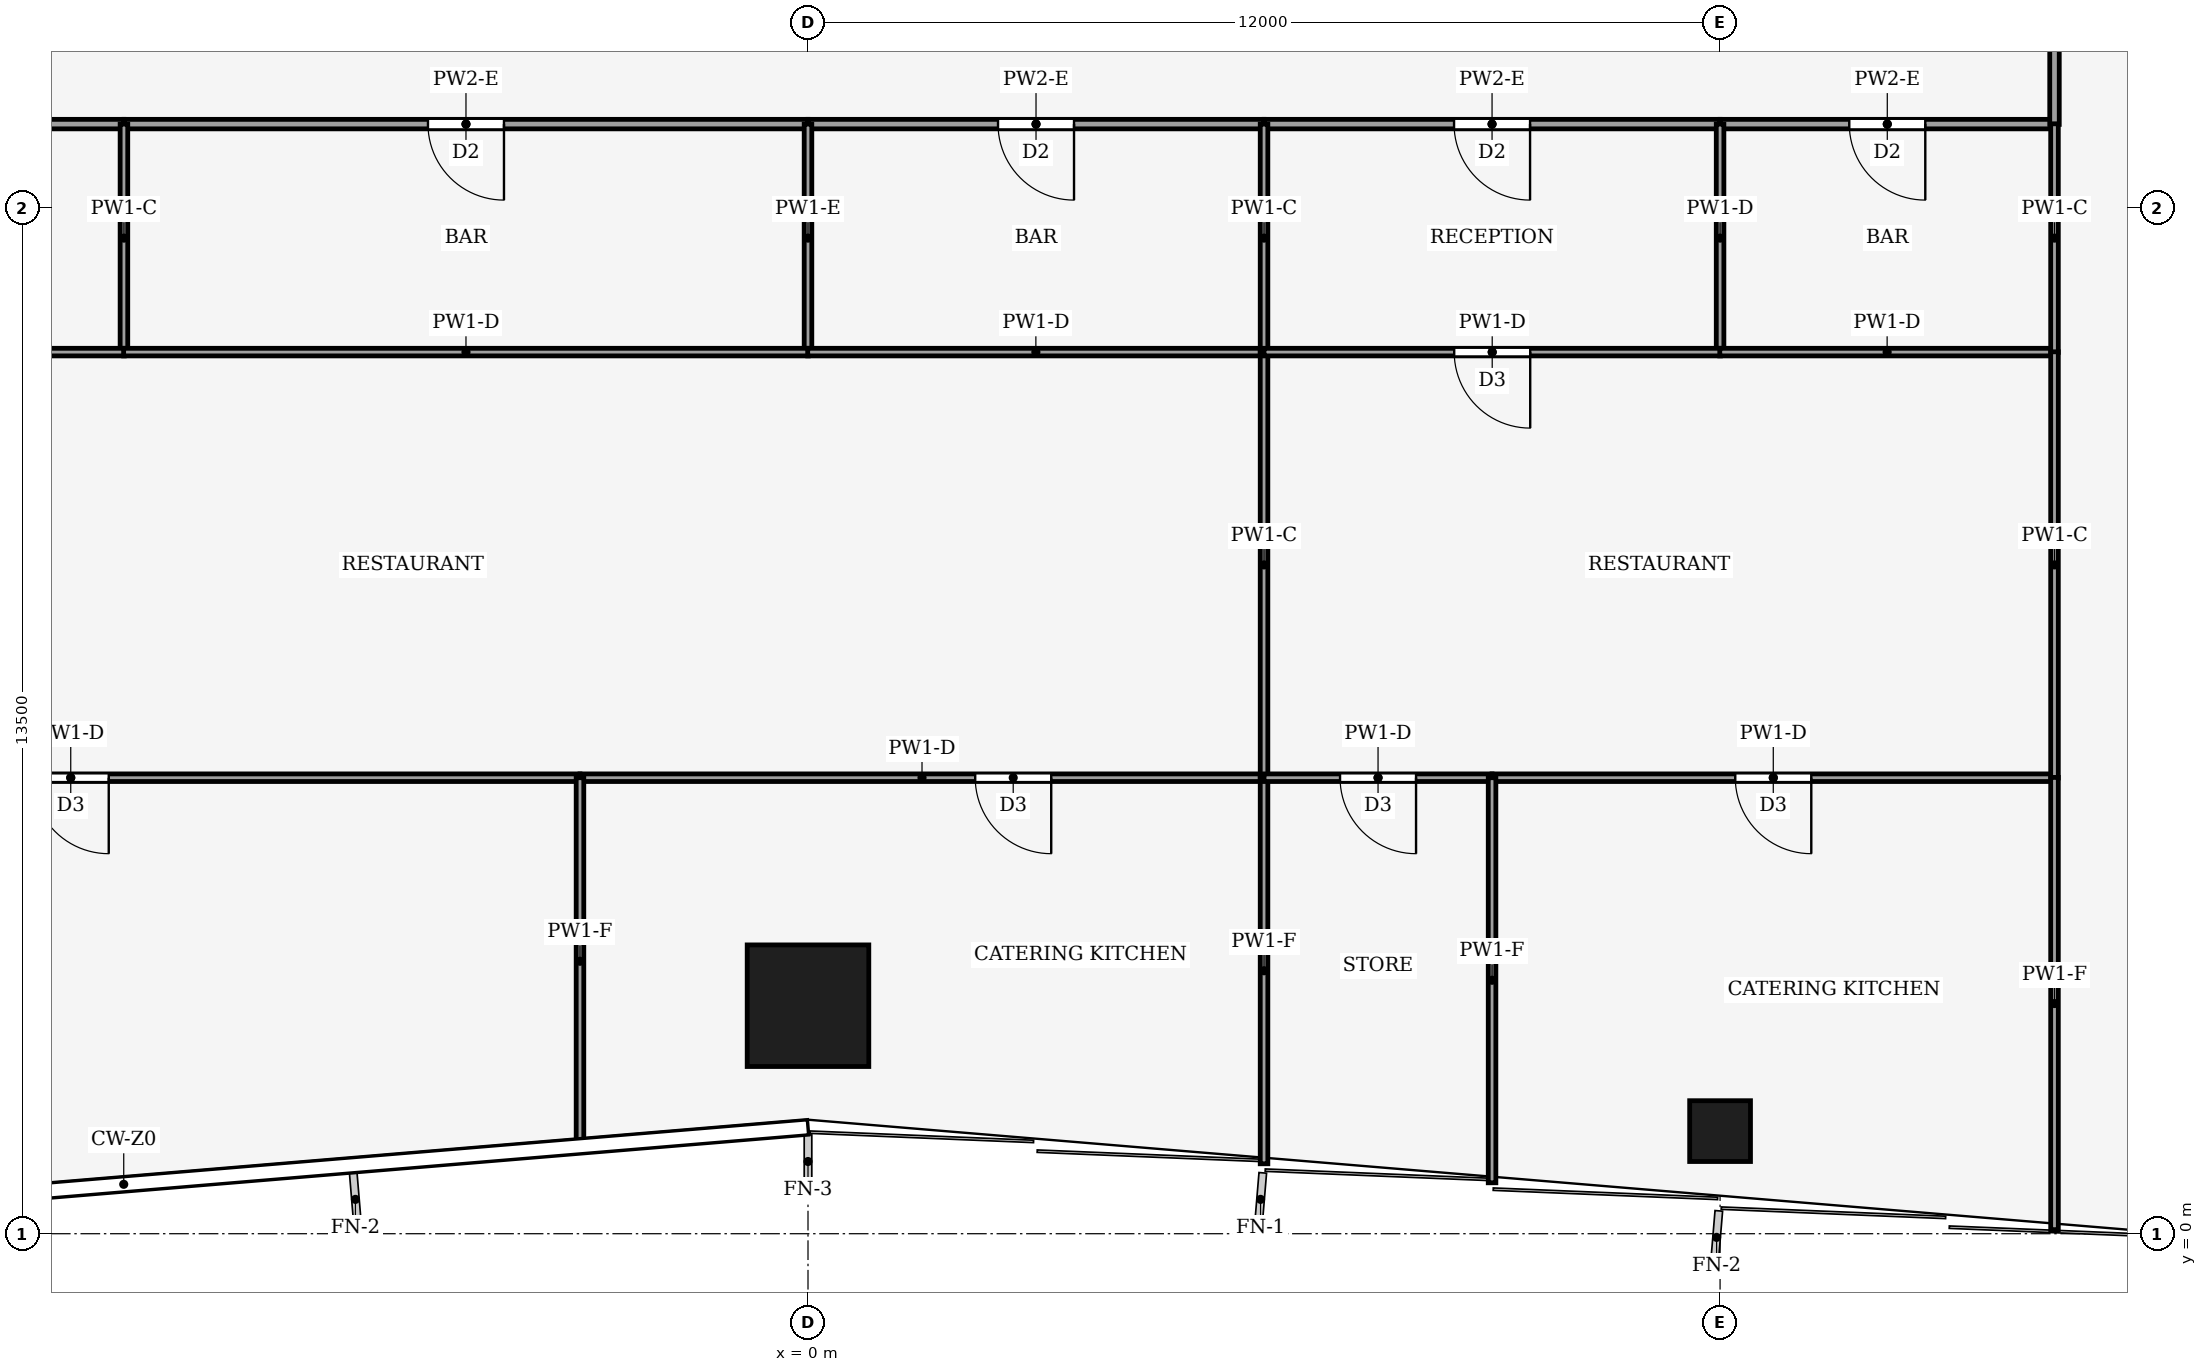
"""IFC4 building model, lengths in metres.
Left out: names, types, materials, properties, quantities, classifications, styles, units other than length and angle.
Written with IfcOpenShell. Run it as: python <this file> out.ifc"""

import sys

from ifc_helpers import new_model, si_unit, direction, frame, frame_2d, origin, origin_2d, place, context, subcontext, project, spatial, rectangle, hollow_rectangle, extrude, element, fill, save


model = new_model("IFC4")
c1 = context("Model", 3, precision=1e-05, world=origin(), true_north=direction((0.0, 1.0)))
c2 = subcontext(c1, "Body", "Model", "MODEL_VIEW")
j1 = project(units=[si_unit("LENGTHUNIT", "METRE"), si_unit("PLANEANGLEUNIT", "RADIAN")], contexts=[c1])
p1 = place(None, origin())
s1 = spatial("IfcSite", under=j1, at=p1, CompositionType="ELEMENT")
p2 = place(p1, origin())
s2 = spatial("IfcBuilding", under=s1, at=p2, CompositionType="ELEMENT")
p3 = place(p2, frame((0.0, 0.0, 14.0)))
s3 = spatial("IfcBuildingStorey", under=s2, at=p3, CompositionType="ELEMENT", Elevation=14.0)
p4 = place(p3, frame((0.0, 3.0, 0.0), z_axis=(0.0, 0.0, 1.0), x_axis=(1.0, 0.0, 0.0)))
e1 = element("IfcColumn", 1, at=p4, inside=s3, PredefinedType="COLUMN", context=c2, shape_type="SweptSolid", body=[
    extrude(hollow_rectangle(XDim=1.6, YDim=1.6, WallThickness=0.09, at=origin_2d()), origin(), (0.0, 0.0, 1.0), 4.0),
])
p5 = place(p3, frame((12.0, 1.35, 0.0), z_axis=(0.0, 0.0, 1.0), x_axis=(1.0, 0.0, 0.0)))
e2 = element("IfcColumn", 2, at=p5, inside=s3, PredefinedType="COLUMN", context=c2, shape_type="SweptSolid", body=[
    extrude(hollow_rectangle(XDim=0.8, YDim=0.8, WallThickness=0.04, at=origin_2d()), origin(), (0.0, 0.0, 1.0), 4.0),
])
p6 = place(p3, frame((-9.0, 14.6, 0.0), z_axis=(0.0, 0.0, 1.0), x_axis=(-1.0, 0.0, 0.0)))
e3 = element("IfcWall", 3, at=p6, inside=s3, PredefinedType="PARTITIONING", context=c2, shape_type="SweptSolid", body=[
    extrude(rectangle(XDim=7.4, YDim=0.125, at=frame_2d((3.7, 0.0))), origin(), (0.0, 0.0, 1.0), 3.29),
])
p7 = place(p6, frame((3.2, 0.0, 0.0)))
e4 = element("IfcOpeningElement", 4, at=p7, cuts=e3, PredefinedType="OPENING", context=c2, shape_type="SweptSolid", body=[
    extrude(rectangle(XDim=1.0, YDim=2.1, at=frame_2d((0.5, 1.05))), frame((0.0, 0.073, 0.0), z_axis=(0.0, -1.0, 0.0), x_axis=(1.0, 0.0, 0.0)), (0.0, 0.0, 1.0), 0.145),
])
p8 = place(p3, frame((0.0, 14.6, 0.0), z_axis=(0.0, 0.0, 1.0), x_axis=(-1.0, 0.0, 0.0)))
e5 = element("IfcWall", 5, at=p8, inside=s3, PredefinedType="PARTITIONING", context=c2, shape_type="SweptSolid", body=[
    extrude(rectangle(XDim=9.0, YDim=0.125, at=frame_2d((4.5, 0.0))), origin(), (0.0, 0.0, 1.0), 3.29),
])
p9 = place(p8, frame((4.0, 0.0, 0.0)))
e6 = element("IfcOpeningElement", 6, at=p9, cuts=e5, PredefinedType="OPENING", context=c2, shape_type="SweptSolid", body=[
    extrude(rectangle(XDim=1.0, YDim=2.1, at=frame_2d((0.5, 1.05))), frame((0.0, 0.073, 0.0), z_axis=(0.0, -1.0, 0.0), x_axis=(1.0, 0.0, 0.0)), (0.0, 0.0, 1.0), 0.145),
])
p10 = place(p3, frame((6.0, 14.6, 0.0), z_axis=(0.0, 0.0, 1.0), x_axis=(-1.0, 0.0, 0.0)))
e7 = element("IfcWall", 7, at=p10, inside=s3, PredefinedType="PARTITIONING", context=c2, shape_type="SweptSolid", body=[
    extrude(rectangle(XDim=6.0, YDim=0.125, at=frame_2d((3.0, 0.0))), origin(), (0.0, 0.0, 1.0), 3.29),
])
p11 = place(p10, frame((2.5, 0.0, 0.0)))
e8 = element("IfcOpeningElement", 8, at=p11, cuts=e7, PredefinedType="OPENING", context=c2, shape_type="SweptSolid", body=[
    extrude(rectangle(XDim=1.0, YDim=2.1, at=frame_2d((0.5, 1.05))), frame((0.0, 0.073, 0.0), z_axis=(0.0, -1.0, 0.0), x_axis=(1.0, 0.0, 0.0)), (0.0, 0.0, 1.0), 0.145),
])
p12 = place(p3, frame((12.0, 14.6, 0.0), z_axis=(0.0, 0.0, 1.0), x_axis=(-1.0, 0.0, 0.0)))
e9 = element("IfcWall", 9, at=p12, inside=s3, PredefinedType="PARTITIONING", context=c2, shape_type="SweptSolid", body=[
    extrude(rectangle(XDim=6.0, YDim=0.125, at=frame_2d((3.0, 0.0))), origin(), (0.0, 0.0, 1.0), 3.29),
])
p13 = place(p12, frame((2.5, 0.0, 0.0)))
e10 = element("IfcOpeningElement", 10, at=p13, cuts=e9, PredefinedType="OPENING", context=c2, shape_type="SweptSolid", body=[
    extrude(rectangle(XDim=1.0, YDim=2.1, at=frame_2d((0.5, 1.05))), frame((0.0, 0.073, 0.0), z_axis=(0.0, -1.0, 0.0), x_axis=(1.0, 0.0, 0.0)), (0.0, 0.0, 1.0), 0.145),
])
p14 = place(p3, frame((16.4, 14.6, 0.0), z_axis=(0.0, 0.0, 1.0), x_axis=(-1.0, 0.0, 0.0)))
e11 = element("IfcWall", 11, at=p14, inside=s3, PredefinedType="PARTITIONING", context=c2, shape_type="SweptSolid", body=[
    extrude(rectangle(XDim=4.4, YDim=0.125, at=frame_2d((2.2, 0.0))), origin(), (0.0, 0.0, 1.0), 3.29),
])
p15 = place(p14, frame((1.7, 0.0, 0.0)))
e12 = element("IfcOpeningElement", 12, at=p15, cuts=e11, PredefinedType="OPENING", context=c2, shape_type="SweptSolid", body=[
    extrude(rectangle(XDim=1.0, YDim=2.1, at=frame_2d((0.5, 1.05))), frame((0.0, 0.073, 0.0), z_axis=(0.0, -1.0, 0.0), x_axis=(1.0, 0.0, 0.0)), (0.0, 0.0, 1.0), 0.145),
])
p16 = place(p3, frame((16.4, 14.596, 0.0), z_axis=(0.0, 0.0, 1.0), x_axis=(0.0, 1.0, 0.0)))
e13 = element("IfcWall", 13, at=p16, inside=s3, PredefinedType="PARTITIONING", context=c2, shape_type="SweptSolid", body=[
    extrude(rectangle(XDim=15.404, YDim=0.125, at=frame_2d((7.702, 0.0))), origin(), (0.0, 0.0, 1.0), 3.14),
])
p17 = place(p16, frame((6.802, 0.0, 0.0)))
e14 = element("IfcOpeningElement", 14, at=p17, cuts=e13, PredefinedType="OPENING", context=c2, shape_type="SweptSolid", body=[
    extrude(rectangle(XDim=1.8, YDim=2.1, at=frame_2d((0.9, 1.05))), frame((0.0, 0.073, 0.0), z_axis=(0.0, -1.0, 0.0), x_axis=(1.0, 0.0, 0.0)), (0.0, 0.0, 1.0), 0.145),
])
p18 = place(p3, frame((-9.0, 11.6, 0.0), z_axis=(0.0, 0.0, 1.0), x_axis=(0.0, 1.0, 0.0)))
e15 = element("IfcWall", 15, at=p18, inside=s3, PredefinedType="PARTITIONING", context=c2, shape_type="SweptSolid", body=[
    extrude(rectangle(XDim=3.0, YDim=0.1, at=frame_2d((1.5, 0.0))), origin(), (0.0, 0.0, 1.0), 3.87),
])
p19 = place(p3, frame((-8.996, 11.6, 0.0), z_axis=(0.0, 0.0, 1.0), x_axis=(-1.0, 0.0, 0.0)))
e16 = element("IfcWall", 16, at=p19, inside=s3, PredefinedType="PARTITIONING", context=c2, shape_type="SweptSolid", body=[
    extrude(rectangle(XDim=7.404, YDim=0.1, at=frame_2d((3.702, 0.0))), origin(), (0.0, 0.0, 1.0), 3.29),
])
p20 = place(p19, frame((2.802, 0.0, 0.0)))
e17 = element("IfcOpeningElement", 17, at=p20, cuts=e16, PredefinedType="OPENING", context=c2, shape_type="SweptSolid", body=[
    extrude(rectangle(XDim=1.8, YDim=2.1, at=frame_2d((0.9, 1.05))), frame((0.0, 0.06, 0.0), z_axis=(0.0, -1.0, 0.0), x_axis=(1.0, 0.0, 0.0)), (0.0, 0.0, 1.0), 0.12),
])
p21 = place(p3, frame((0.0, 11.6, 0.0), z_axis=(0.0, 0.0, 1.0), x_axis=(0.0, 1.0, 0.0)))
e18 = element("IfcWall", 18, at=p21, inside=s3, PredefinedType="PARTITIONING", context=c2, shape_type="SweptSolid", body=[
    extrude(rectangle(XDim=3.0, YDim=0.1, at=frame_2d((1.5, 0.0))), origin(), (0.0, 0.0, 1.0), 3.34),
])
p22 = place(p3, frame((-9.004, 11.6, 0.0), z_axis=(0.0, 0.0, 1.0), x_axis=(1.0, 0.0, 0.0)))
e19 = element("IfcWall", 19, at=p22, inside=s3, PredefinedType="PARTITIONING", context=c2, shape_type="SweptSolid", body=[
    extrude(rectangle(XDim=9.008, YDim=0.1, at=frame_2d((4.504, 0.0))), origin(), (0.0, 0.0, 1.0), 3.29),
])
p23 = place(p3, frame((-0.004, 11.6, 0.0), z_axis=(0.0, 0.0, 1.0), x_axis=(1.0, 0.0, 0.0)))
e20 = element("IfcWall", 20, at=p23, inside=s3, PredefinedType="PARTITIONING", context=c2, shape_type="SweptSolid", body=[
    extrude(rectangle(XDim=6.004, YDim=0.1, at=frame_2d((3.002, 0.0))), origin(), (0.0, 0.0, 1.0), 3.29),
])
p24 = place(p3, frame((6.0, 11.6, 0.0), z_axis=(0.0, 0.0, 1.0), x_axis=(0.0, 1.0, 0.0)))
e21 = element("IfcWall", 21, at=p24, inside=s3, PredefinedType="PARTITIONING", context=c2, shape_type="SweptSolid", body=[
    extrude(rectangle(XDim=3.0, YDim=0.1, at=frame_2d((1.5, 0.0))), origin(), (0.0, 0.0, 1.0), 3.87),
])
p25 = place(p3, frame((-3.0, 6.0, 0.0), z_axis=(0.0, 0.0, 1.0), x_axis=(-1.0, 0.0, 0.0)))
e22 = element("IfcWall", 22, at=p25, inside=s3, PredefinedType="PARTITIONING", context=c2, shape_type="SweptSolid", body=[
    extrude(rectangle(XDim=13.4, YDim=0.1, at=frame_2d((6.7, 0.0))), origin(), (0.0, 0.0, 1.0), 3.29),
])
p26 = place(p25, frame((6.2, 0.0, 0.0)))
e23 = element("IfcOpeningElement", 23, at=p26, cuts=e22, PredefinedType="OPENING", context=c2, shape_type="SweptSolid", body=[
    extrude(rectangle(XDim=1.0, YDim=2.1, at=frame_2d((0.5, 1.05))), frame((0.0, 0.06, 0.0), z_axis=(0.0, -1.0, 0.0), x_axis=(1.0, 0.0, 0.0)), (0.0, 0.0, 1.0), 0.12),
])
p27 = place(p3, frame((6.0, 6.0, 0.0), z_axis=(0.0, 0.0, 1.0), x_axis=(-1.0, 0.0, 0.0)))
e24 = element("IfcWall", 24, at=p27, inside=s3, PredefinedType="PARTITIONING", context=c2, shape_type="SweptSolid", body=[
    extrude(rectangle(XDim=9.0, YDim=0.1, at=frame_2d((4.5, 0.0))), origin(), (0.0, 0.0, 1.0), 3.29),
])
p28 = place(p27, frame((2.8, 0.0, 0.0)))
e25 = element("IfcOpeningElement", 25, at=p28, cuts=e24, PredefinedType="OPENING", context=c2, shape_type="SweptSolid", body=[
    extrude(rectangle(XDim=1.0, YDim=2.1, at=frame_2d((0.5, 1.05))), frame((0.0, 0.06, 0.0), z_axis=(0.0, -1.0, 0.0), x_axis=(1.0, 0.0, 0.0)), (0.0, 0.0, 1.0), 0.12),
])
p29 = place(p3, frame((6.0, 6.0, 0.0), z_axis=(0.0, 0.0, 1.0), x_axis=(0.0, 1.0, 0.0)))
e26 = element("IfcWall", 26, at=p29, inside=s3, PredefinedType="PARTITIONING", context=c2, shape_type="SweptSolid", body=[
    extrude(rectangle(XDim=5.6, YDim=0.1, at=frame_2d((2.8, 0.0))), origin(), (0.0, 0.0, 1.0), 3.87),
])
p30 = place(p3, frame((-3.0, 1.17, 0.0), z_axis=(0.0, 0.0, 1.0), x_axis=(0.0, 1.0, 0.0)))
e27 = element("IfcWall", 27, at=p30, inside=s3, PredefinedType="PARTITIONING", context=c2, shape_type="SweptSolid", body=[
    extrude(rectangle(XDim=4.83, YDim=0.1, at=frame_2d((2.415, 0.0))), origin(), (0.0, 0.0, 1.0), 3.04),
])
p31 = place(p3, frame((6.0, 0.92, 0.0), z_axis=(0.0, 0.0, 1.0), x_axis=(0.0, 1.0, 0.0)))
e28 = element("IfcWall", 28, at=p31, inside=s3, PredefinedType="PARTITIONING", context=c2, shape_type="SweptSolid", body=[
    extrude(rectangle(XDim=5.08, YDim=0.1, at=frame_2d((2.54, 0.0))), origin(), (0.0, 0.0, 1.0), 3.04),
])
p32 = place(p3, frame((12.0, 11.6, 0.0), z_axis=(0.0, 0.0, 1.0), x_axis=(0.0, 1.0, 0.0)))
e29 = element("IfcWall", 29, at=p32, inside=s3, PredefinedType="PARTITIONING", context=c2, shape_type="SweptSolid", body=[
    extrude(rectangle(XDim=3.0, YDim=0.1, at=frame_2d((1.5, 0.0))), origin(), (0.0, 0.0, 1.0), 3.29),
])
p33 = place(p3, frame((12.004, 11.6, 0.0), z_axis=(0.0, 0.0, 1.0), x_axis=(-1.0, 0.0, 0.0)))
e30 = element("IfcWall", 30, at=p33, inside=s3, PredefinedType="PARTITIONING", context=c2, shape_type="SweptSolid", body=[
    extrude(rectangle(XDim=6.004, YDim=0.1, at=frame_2d((3.002, 0.0))), origin(), (0.0, 0.0, 1.0), 3.29),
])
p34 = place(p33, frame((2.502, 0.0, 0.0)))
e31 = element("IfcOpeningElement", 31, at=p34, cuts=e30, PredefinedType="OPENING", context=c2, shape_type="SweptSolid", body=[
    extrude(rectangle(XDim=1.0, YDim=2.1, at=frame_2d((0.5, 1.05))), frame((0.0, 0.06, 0.0), z_axis=(0.0, -1.0, 0.0), x_axis=(1.0, 0.0, 0.0)), (0.0, 0.0, 1.0), 0.12),
])
p35 = place(p3, frame((11.996, 11.6, 0.0), z_axis=(0.0, 0.0, 1.0), x_axis=(1.0, 0.0, 0.0)))
e32 = element("IfcWall", 32, at=p35, inside=s3, PredefinedType="PARTITIONING", context=c2, shape_type="SweptSolid", body=[
    extrude(rectangle(XDim=4.404, YDim=0.1, at=frame_2d((2.202, 0.0))), origin(), (0.0, 0.0, 1.0), 3.29),
])
p36 = place(p3, frame((16.4, 11.596, 0.0), z_axis=(0.0, 0.0, 1.0), x_axis=(0.0, 1.0, 0.0)))
e33 = element("IfcWall", 33, at=p36, inside=s3, PredefinedType="PARTITIONING", context=c2, shape_type="SweptSolid", body=[
    extrude(rectangle(XDim=3.008, YDim=0.1, at=frame_2d((1.504, 0.0))), origin(), (0.0, 0.0, 1.0), 3.87),
])
p37 = place(p3, frame((9.0, 6.0, 0.0), z_axis=(0.0, 0.0, 1.0), x_axis=(-1.0, 0.0, 0.0)))
e34 = element("IfcWall", 34, at=p37, inside=s3, PredefinedType="PARTITIONING", context=c2, shape_type="SweptSolid", body=[
    extrude(rectangle(XDim=3.0, YDim=0.1, at=frame_2d((1.5, 0.0))), origin(), (0.0, 0.0, 1.0), 3.29),
])
p38 = place(p37, frame((1.0, 0.0, 0.0)))
e35 = element("IfcOpeningElement", 35, at=p38, cuts=e34, PredefinedType="OPENING", context=c2, shape_type="SweptSolid", body=[
    extrude(rectangle(XDim=1.0, YDim=2.1, at=frame_2d((0.5, 1.05))), frame((0.0, 0.06, 0.0), z_axis=(0.0, -1.0, 0.0), x_axis=(1.0, 0.0, 0.0)), (0.0, 0.0, 1.0), 0.12),
])
p39 = place(p3, frame((16.4, 6.0, 0.0), z_axis=(0.0, 0.0, 1.0), x_axis=(-1.0, 0.0, 0.0)))
e36 = element("IfcWall", 36, at=p39, inside=s3, PredefinedType="PARTITIONING", context=c2, shape_type="SweptSolid", body=[
    extrude(rectangle(XDim=7.4, YDim=0.1, at=frame_2d((3.7, 0.0))), origin(), (0.0, 0.0, 1.0), 3.29),
])
p40 = place(p39, frame((3.2, 0.0, 0.0)))
e37 = element("IfcOpeningElement", 37, at=p40, cuts=e36, PredefinedType="OPENING", context=c2, shape_type="SweptSolid", body=[
    extrude(rectangle(XDim=1.0, YDim=2.1, at=frame_2d((0.5, 1.05))), frame((0.0, 0.06, 0.0), z_axis=(0.0, -1.0, 0.0), x_axis=(1.0, 0.0, 0.0)), (0.0, 0.0, 1.0), 0.12),
])
p41 = place(p3, frame((16.4, 5.996, 0.0), z_axis=(0.0, 0.0, 1.0), x_axis=(0.0, 1.0, 0.0)))
e38 = element("IfcWall", 38, at=p41, inside=s3, PredefinedType="PARTITIONING", context=c2, shape_type="SweptSolid", body=[
    extrude(rectangle(XDim=5.608, YDim=0.1, at=frame_2d((2.804, 0.0))), origin(), (0.0, 0.0, 1.0), 3.87),
])
p42 = place(p3, frame((9.0, 0.67, 0.0), z_axis=(0.0, 0.0, 1.0), x_axis=(0.0, 1.0, 0.0)))
e39 = element("IfcWall", 39, at=p42, inside=s3, PredefinedType="PARTITIONING", context=c2, shape_type="SweptSolid", body=[
    extrude(rectangle(XDim=5.33, YDim=0.1, at=frame_2d((2.665, 0.0))), origin(), (0.0, 0.0, 1.0), 3.04),
])
p43 = place(p3, frame((16.4, 0.053, 0.0), z_axis=(0.0, 0.0, 1.0), x_axis=(0.0, 1.0, 0.0)))
e40 = element("IfcWall", 40, at=p43, inside=s3, PredefinedType="PARTITIONING", context=c2, shape_type="SweptSolid", body=[
    extrude(rectangle(XDim=5.951, YDim=0.1, at=frame_2d((2.975, 0.0))), origin(), (0.0, 0.0, 1.0), 3.04),
])
p44 = place(p9, origin())
e41 = element("IfcDoor", 41, at=p44, inside=s3, OperationType="SINGLE_SWING_RIGHT", PredefinedType="DOOR", context=c2, shape_type="SweptSolid", body=[
    extrude(rectangle(XDim=1.0, YDim=2.1, at=frame_2d((0.5, 1.05))), frame((0.0, 0.025, 0.0), z_axis=(0.0, -1.0, 0.0), x_axis=(1.0, 0.0, 0.0)), (0.0, 0.0, 1.0), 0.05),
])
fill(e6, e41)
p45 = place(p11, origin())
e42 = element("IfcDoor", 42, at=p45, inside=s3, OperationType="SINGLE_SWING_LEFT", PredefinedType="DOOR", context=c2, shape_type="SweptSolid", body=[
    extrude(rectangle(XDim=1.0, YDim=2.1, at=frame_2d((0.5, 1.05))), frame((0.0, 0.025, 0.0), z_axis=(0.0, -1.0, 0.0), x_axis=(1.0, 0.0, 0.0)), (0.0, 0.0, 1.0), 0.05),
])
fill(e8, e42)
p46 = place(p13, origin())
e43 = element("IfcDoor", 43, at=p46, inside=s3, OperationType="SINGLE_SWING_RIGHT", PredefinedType="DOOR", context=c2, shape_type="SweptSolid", body=[
    extrude(rectangle(XDim=1.0, YDim=2.1, at=frame_2d((0.5, 1.05))), frame((0.0, 0.025, 0.0), z_axis=(0.0, -1.0, 0.0), x_axis=(1.0, 0.0, 0.0)), (0.0, 0.0, 1.0), 0.05),
])
fill(e10, e43)
p47 = place(p15, origin())
e44 = element("IfcDoor", 44, at=p47, inside=s3, OperationType="SINGLE_SWING_LEFT", PredefinedType="DOOR", context=c2, shape_type="SweptSolid", body=[
    extrude(rectangle(XDim=1.0, YDim=2.1, at=frame_2d((0.5, 1.05))), frame((0.0, 0.025, 0.0), z_axis=(0.0, -1.0, 0.0), x_axis=(1.0, 0.0, 0.0)), (0.0, 0.0, 1.0), 0.05),
])
fill(e12, e44)
p48 = place(p26, origin())
e45 = element("IfcDoor", 45, at=p48, inside=s3, OperationType="SINGLE_SWING_RIGHT", PredefinedType="DOOR", context=c2, shape_type="SweptSolid", body=[
    extrude(rectangle(XDim=1.0, YDim=2.1, at=frame_2d((0.5, 1.05))), frame((0.0, 0.025, 0.0), z_axis=(0.0, -1.0, 0.0), x_axis=(1.0, 0.0, 0.0)), (0.0, 0.0, 1.0), 0.05),
])
fill(e23, e45)
p49 = place(p28, origin())
e46 = element("IfcDoor", 46, at=p49, inside=s3, OperationType="SINGLE_SWING_LEFT", PredefinedType="DOOR", context=c2, shape_type="SweptSolid", body=[
    extrude(rectangle(XDim=1.0, YDim=2.1, at=frame_2d((0.5, 1.05))), frame((0.0, 0.025, 0.0), z_axis=(0.0, -1.0, 0.0), x_axis=(1.0, 0.0, 0.0)), (0.0, 0.0, 1.0), 0.05),
])
fill(e25, e46)
p50 = place(p34, origin())
e47 = element("IfcDoor", 47, at=p50, inside=s3, OperationType="SINGLE_SWING_RIGHT", PredefinedType="DOOR", context=c2, shape_type="SweptSolid", body=[
    extrude(rectangle(XDim=1.0, YDim=2.1, at=frame_2d((0.5, 1.05))), frame((0.0, 0.025, 0.0), z_axis=(0.0, -1.0, 0.0), x_axis=(1.0, 0.0, 0.0)), (0.0, 0.0, 1.0), 0.05),
])
fill(e31, e47)
p51 = place(p38, origin())
e48 = element("IfcDoor", 48, at=p51, inside=s3, OperationType="SINGLE_SWING_LEFT", PredefinedType="DOOR", context=c2, shape_type="SweptSolid", body=[
    extrude(rectangle(XDim=1.0, YDim=2.1, at=frame_2d((0.5, 1.05))), frame((0.0, 0.025, 0.0), z_axis=(0.0, -1.0, 0.0), x_axis=(1.0, 0.0, 0.0)), (0.0, 0.0, 1.0), 0.05),
])
fill(e35, e48)
p52 = place(p40, origin())
e49 = element("IfcDoor", 49, at=p52, inside=s3, OperationType="SINGLE_SWING_RIGHT", PredefinedType="DOOR", context=c2, shape_type="SweptSolid", body=[
    extrude(rectangle(XDim=1.0, YDim=2.1, at=frame_2d((0.5, 1.05))), frame((0.0, 0.025, 0.0), z_axis=(0.0, -1.0, 0.0), x_axis=(1.0, 0.0, 0.0)), (0.0, 0.0, 1.0), 0.05),
])
fill(e37, e49)
save(model, sys.argv[1])
